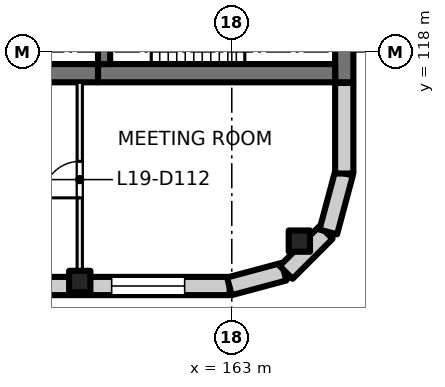
"""IFC4 building model, lengths in metres.
Left out: names, types, materials, properties, quantities, classifications, styles, units other than length and angle.
Written with IfcOpenShell. Run it as: python <this file> out.ifc"""

import sys

from ifc_helpers import new_model, si_unit, direction, frame, frame_2d, origin, origin_2d, place, context, subcontext, project, spatial, rectangle, extrude, element, fill, save


model = new_model("IFC4")
c1 = context("Model", 3, precision=1e-05, world=origin(), true_north=direction((0.0, 1.0)))
c2 = subcontext(c1, "Body", "Model", "MODEL_VIEW")
j1 = project(units=[si_unit("LENGTHUNIT", "METRE"), si_unit("PLANEANGLEUNIT", "RADIAN")], contexts=[c1])
p1 = place(None, origin())
s1 = spatial("IfcSite", under=j1, at=p1, CompositionType="ELEMENT")
p2 = place(p1, origin())
s2 = spatial("IfcBuilding", under=s1, at=p2, CompositionType="ELEMENT")
p3 = place(p2, frame((0.0, 0.0, 85.0)))
s3 = spatial("IfcBuildingStorey", under=s2, at=p3, CompositionType="ELEMENT", Elevation=85.0)
for number, where, z_axis, x_axis in (
    (1, (165.223, 111.777, 0.0), (0.0, 0.0, 1.0), (1.0, 0.0, 0.0)),
    (2, (158.0, 110.45, 0.0), (0.0, 0.0, 1.0), (1.0, 0.0, 0.0)),
):
    element("IfcColumn", number, at=place(p3, frame(where, z_axis=z_axis, x_axis=x_axis)), inside=s3, PredefinedType="COLUMN", context=c2, shape_type="SweptSolid", body=[
        extrude(rectangle(XDim=0.7, YDim=0.7, at=origin_2d()), origin(), (0.0, 0.0, 1.0), 4.0),
    ])
p4 = place(p3, frame((166.7, 120.8, 0.0), z_axis=(0.0, 0.0, 1.0), x_axis=(0.0, -1.0, 0.0)))
e3 = element("IfcWall", 3, at=p4, inside=s3, PredefinedType="SHEAR", context=c2, shape_type="SweptSolid", body=[
    extrude(rectangle(XDim=3.8, YDim=0.6, at=frame_2d((1.9, 0.0))), origin(), (0.0, 0.0, 1.0), 4.0),
])
p5 = place(p3, frame((166.4, 117.3, 0.0), z_axis=(0.0, 0.0, 1.0), x_axis=(-1.0, 0.0, 0.0)))
e4 = element("IfcWall", 4, at=p5, inside=s3, PredefinedType="SHEAR", context=c2, shape_type="SweptSolid", body=[
    extrude(rectangle(XDim=7.8, YDim=0.6, at=frame_2d((3.9, 0.0))), origin(), (0.0, 0.0, 1.0), 4.0),
])
p6 = place(p3, frame((158.6, 117.3, 0.0), z_axis=(0.0, 0.0, 1.0), x_axis=(-1.0, 0.0, 0.0)))
e5 = element("IfcWall", 5, at=p6, inside=s3, PredefinedType="SHEAR", context=c2, shape_type="SweptSolid", body=[
    extrude(rectangle(XDim=4.6, YDim=0.6, at=frame_2d((2.3, 0.0))), origin(), (0.0, 0.0, 1.0), 4.0),
])
p7 = place(p3, frame((158.8, 120.4, 0.0), z_axis=(0.0, 0.0, 1.0), x_axis=(0.0, -1.0, 0.0)))
e6 = element("IfcWall", 6, at=p7, inside=s3, PredefinedType="SHEAR", context=c2, shape_type="SweptSolid", body=[
    extrude(rectangle(XDim=2.8, YDim=0.4, at=frame_2d((1.4, 0.0))), origin(), (0.0, 0.0, 1.0), 4.0),
])
p8 = place(p7, frame((0.9, 0.0, 0.0)))
e7 = element("IfcOpeningElement", 7, at=p8, cuts=e6, PredefinedType="OPENING", context=c2, shape_type="SweptSolid", body=[
    extrude(rectangle(XDim=1.0, YDim=2.1, at=frame_2d((0.5, 1.05))), frame((0.0, 0.21, 0.0), z_axis=(0.0, -1.0, 0.0), x_axis=(1.0, 0.0, 0.0)), (0.0, 0.0, 1.0), 0.42),
])
p9 = place(p3, frame((162.93, 110.3, 0.0), z_axis=(0.0, 0.0, 1.0), x_axis=(-1.0, 0.0, 0.0)))
e8 = element("IfcWall", 8, at=p9, inside=s3, PredefinedType="SOLIDWALL", context=c2, shape_type="SweptSolid", body=[
    extrude(rectangle(XDim=31.93, YDim=0.6, at=frame_2d((15.965, 0.0))), origin(), (0.0, 0.0, 1.0), 3.625),
])
p10 = place(p9, frame((1.48, 0.0, 0.9)))
e9 = element("IfcOpeningElement", 9, at=p10, cuts=e8, PredefinedType="OPENING", context=c2, shape_type="SweptSolid", body=[
    extrude(rectangle(XDim=2.4, YDim=2.4, at=frame_2d((1.2, 1.2))), frame((0.0, 0.31, 0.0), z_axis=(0.0, -1.0, 0.0), x_axis=(1.0, 0.0, 0.0)), (0.0, 0.0, 1.0), 0.62),
])
p11 = place(p9, frame((5.98, 0.0, 0.9)))
e10 = element("IfcOpeningElement", 10, at=p11, cuts=e8, PredefinedType="OPENING", context=c2, shape_type="SweptSolid", body=[
    extrude(rectangle(XDim=2.4, YDim=2.4, at=frame_2d((1.2, 1.2))), frame((0.0, 0.31, 0.0), z_axis=(0.0, -1.0, 0.0), x_axis=(1.0, 0.0, 0.0)), (0.0, 0.0, 1.0), 0.62),
])
p12 = place(p9, frame((10.48, 0.0, 0.9)))
e11 = element("IfcOpeningElement", 11, at=p12, cuts=e8, PredefinedType="OPENING", context=c2, shape_type="SweptSolid", body=[
    extrude(rectangle(XDim=2.4, YDim=2.4, at=frame_2d((1.2, 1.2))), frame((0.0, 0.31, 0.0), z_axis=(0.0, -1.0, 0.0), x_axis=(1.0, 0.0, 0.0)), (0.0, 0.0, 1.0), 0.62),
])
p13 = place(p9, frame((14.98, 0.0, 0.9)))
e12 = element("IfcOpeningElement", 12, at=p13, cuts=e8, PredefinedType="OPENING", context=c2, shape_type="SweptSolid", body=[
    extrude(rectangle(XDim=2.4, YDim=2.4, at=frame_2d((1.2, 1.2))), frame((0.0, 0.31, 0.0), z_axis=(0.0, -1.0, 0.0), x_axis=(1.0, 0.0, 0.0)), (0.0, 0.0, 1.0), 0.62),
])
p14 = place(p9, frame((19.48, 0.0, 0.9)))
e13 = element("IfcOpeningElement", 13, at=p14, cuts=e8, PredefinedType="OPENING", context=c2, shape_type="SweptSolid", body=[
    extrude(rectangle(XDim=2.4, YDim=2.4, at=frame_2d((1.2, 1.2))), frame((0.0, 0.31, 0.0), z_axis=(0.0, -1.0, 0.0), x_axis=(1.0, 0.0, 0.0)), (0.0, 0.0, 1.0), 0.62),
])
p15 = place(p9, frame((23.98, 0.0, 0.9)))
e14 = element("IfcOpeningElement", 14, at=p15, cuts=e8, PredefinedType="OPENING", context=c2, shape_type="SweptSolid", body=[
    extrude(rectangle(XDim=2.4, YDim=2.4, at=frame_2d((1.2, 1.2))), frame((0.0, 0.31, 0.0), z_axis=(0.0, -1.0, 0.0), x_axis=(1.0, 0.0, 0.0)), (0.0, 0.0, 1.0), 0.62),
])
p16 = place(p9, frame((28.48, 0.0, 0.9)))
e15 = element("IfcOpeningElement", 15, at=p16, cuts=e8, PredefinedType="OPENING", context=c2, shape_type="SweptSolid", body=[
    extrude(rectangle(XDim=2.4, YDim=2.4, at=frame_2d((1.2, 1.2))), frame((0.0, 0.31, 0.0), z_axis=(0.0, -1.0, 0.0), x_axis=(1.0, 0.0, 0.0)), (0.0, 0.0, 1.0), 0.62),
])
for number, where, z_axis, x_axis in (
    (16, (164.719, 110.771, 0.0), (0.0, 0.0, 1.0), (-0.966, -0.259, 0.0)),
    (17, (166.104, 112.064, 0.0), (0.0, 0.0, 1.0), (-0.707, -0.707, 0.0)),
):
    element("IfcWall", number, at=place(p3, frame(where, z_axis=z_axis, x_axis=x_axis)), inside=s3, PredefinedType="SOLIDWALL", context=c2, shape_type="SweptSolid", body=[
        extrude(rectangle(XDim=1.861, YDim=0.6, at=frame_2d((0.93, 0.0))), origin(), (0.0, 0.0, 1.0), 3.625),
    ])
p17 = place(p3, frame((166.692, 114.01, 0.0), z_axis=(0.0, 0.0, 1.0), x_axis=(-0.258839784042, -0.965920269068, 0.0)))
e18 = element("IfcWall", 18, at=p17, inside=s3, PredefinedType="SOLIDWALL", context=c2, shape_type="SweptSolid", body=[
    extrude(rectangle(XDim=2.0, YDim=0.6, at=frame_2d((1.0, 0.0))), origin(), (0.0, 0.0, 1.0), 3.625),
])
p18 = place(p3, frame((166.7, 116.98, 0.0), z_axis=(0.0, 0.0, 1.0), x_axis=(0.0, -1.0, 0.0)))
e19 = element("IfcWall", 19, at=p18, inside=s3, PredefinedType="SOLIDWALL", context=c2, shape_type="SweptSolid", body=[
    extrude(rectangle(XDim=2.98, YDim=0.6, at=frame_2d((1.49, 0.0))), origin(), (0.0, 0.0, 1.0), 3.625),
])
p19 = place(p3, frame((158.0, 110.6, 0.0), z_axis=(0.0, 0.0, 1.0), x_axis=(0.0, 1.0, 0.0)))
e20 = element("IfcWall", 20, at=p19, inside=s3, PredefinedType="PARTITIONING", context=c2, shape_type="SweptSolid", body=[
    extrude(rectangle(XDim=6.4, YDim=0.175, at=frame_2d((3.2, 0.0))), origin(), (0.0, 0.0, 1.0), 3.625),
])
p20 = place(p19, frame((2.6, 0.0, 0.0)))
e21 = element("IfcOpeningElement", 21, at=p20, cuts=e20, PredefinedType="OPENING", context=c2, shape_type="SweptSolid", body=[
    extrude(rectangle(XDim=1.2, YDim=2.1, at=frame_2d((0.6, 1.05))), frame((0.0, 0.097, 0.0), z_axis=(0.0, -1.0, 0.0), x_axis=(1.0, 0.0, 0.0)), (0.0, 0.0, 1.0), 0.195),
])
p21 = place(p10, origin())
e22 = element("IfcWindow", 22, at=p21, inside=s3, PartitioningType="SINGLE_PANEL", PredefinedType="WINDOW", context=c2, shape_type="SweptSolid", body=[
    extrude(rectangle(XDim=2.4, YDim=2.4, at=frame_2d((1.2, 1.2))), frame((0.0, 0.03, 0.0), z_axis=(0.0, -1.0, 0.0), x_axis=(1.0, 0.0, 0.0)), (0.0, 0.0, 1.0), 0.06),
])
fill(e9, e22)
p22 = place(p20, origin())
e23 = element("IfcDoor", 23, at=p22, inside=s3, OperationType="DOUBLE_DOOR_SINGLE_SWING", PredefinedType="DOOR", context=c2, shape_type="SweptSolid", body=[
    extrude(rectangle(XDim=1.2, YDim=2.1, at=frame_2d((0.6, 1.05))), frame((0.0, 0.025, 0.0), z_axis=(0.0, -1.0, 0.0), x_axis=(1.0, 0.0, 0.0)), (0.0, 0.0, 1.0), 0.05),
])
fill(e21, e23)
save(model, sys.argv[1])
